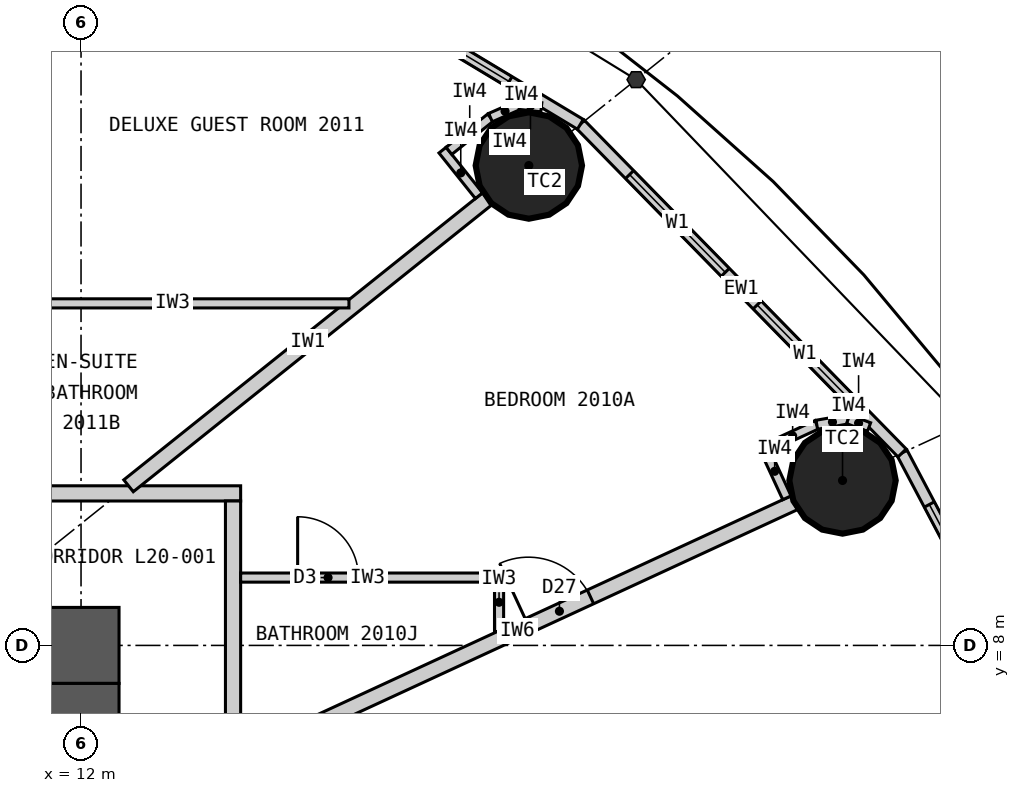
"""IFC4 building model, lengths in metres.
Left out: names, types, materials, properties, quantities, classifications, styles, units other than length and angle.
Written with IfcOpenShell. Run it as: python <this file> out.ifc"""

import sys

from ifc_helpers import new_model, si_unit, direction, frame, frame_2d, origin, origin_2d, place, context, subcontext, project, spatial, rectangle, circle, extrude, element, fill, save


model = new_model("IFC4")
c1 = context("Model", 3, precision=1e-05, world=origin(), true_north=direction((0.0, 1.0)))
c2 = subcontext(c1, "Body", "Model", "MODEL_VIEW")
j1 = project(units=[si_unit("LENGTHUNIT", "METRE"), si_unit("PLANEANGLEUNIT", "RADIAN")], contexts=[c1])
p1 = place(None, origin())
s1 = spatial("IfcSite", under=j1, at=p1, CompositionType="ELEMENT")
p2 = place(p1, origin())
s2 = spatial("IfcBuilding", under=s1, at=p2, CompositionType="ELEMENT")
p3 = place(p2, frame((0.0, 0.0, 80.4)))
s3 = spatial("IfcBuildingStorey", under=s2, at=p3, CompositionType="ELEMENT", Elevation=80.4)
for number, where, z_axis, x_axis in (
    (1, (22.019, 10.17, 0.0), (0.0, 0.0, 1.0), (1.0, 0.0, 0.0)),
    (2, (17.892, 14.313, 0.0), (0.0, 0.0, 1.0), (1.0, 0.0, 0.0)),
):
    element("IfcColumn", number, at=place(p3, frame(where, z_axis=z_axis, x_axis=x_axis)), inside=s3, PredefinedType="COLUMN", context=c2, shape_type="SweptSolid", body=[
        extrude(circle(Radius=0.7, at=origin_2d()), origin(), (0.0, 0.0, 1.0), 3.3),
    ])
p4 = place(p3, frame((-12.5, 8.0, 0.0), z_axis=(0.0, 0.0, 1.0), x_axis=(1.0, 0.0, 0.0)))
e3 = element("IfcWall", 3, at=p4, inside=s3, PredefinedType="SHEAR", context=c2, shape_type="SweptSolid", body=[
    extrude(rectangle(XDim=25.0, YDim=1.0, at=frame_2d((12.5, 0.0))), origin(), (0.0, 0.0, 1.0), 3.3),
])
p5 = place(p4, frame((11.2, 0.0, 0.0)))
e4 = element("IfcOpeningElement", 4, at=p5, cuts=e3, PredefinedType="OPENING", context=c2, shape_type="SweptSolid", body=[
    extrude(rectangle(XDim=1.2, YDim=2.2, at=frame_2d((0.6, 1.1))), frame((0.0, 0.51, 0.0), z_axis=(0.0, -1.0, 0.0), x_axis=(1.0, 0.0, 0.0)), (0.0, 0.0, 1.0), 1.02),
])
p6 = place(p4, frame((18.8, 0.0, 0.0)))
e5 = element("IfcOpeningElement", 5, at=p6, cuts=e3, PredefinedType="OPENING", context=c2, shape_type="SweptSolid", body=[
    extrude(rectangle(XDim=0.9, YDim=2.2, at=frame_2d((0.45, 1.1))), frame((0.0, 0.51, 0.0), z_axis=(0.0, -1.0, 0.0), x_axis=(1.0, 0.0, 0.0)), (0.0, 0.0, 1.0), 1.02),
])
p7 = place(p3, frame((12.0, -7.5, 0.0), z_axis=(0.0, 0.0, 1.0), x_axis=(0.0, 1.0, 0.0)))
e6 = element("IfcWall", 6, at=p7, inside=s3, PredefinedType="SHEAR", context=c2, shape_type="SweptSolid", body=[
    extrude(rectangle(XDim=15.0, YDim=1.0, at=frame_2d((7.5, 0.0))), origin(), (0.0, 0.0, 1.0), 3.3),
])
p8 = place(p7, frame((6.6, 0.0, 0.0)))
e7 = element("IfcOpeningElement", 7, at=p8, cuts=e6, PredefinedType="OPENING", context=c2, shape_type="SweptSolid", body=[
    extrude(rectangle(XDim=1.8, YDim=2.2, at=frame_2d((0.9, 1.1))), frame((0.0, 0.51, 0.0), z_axis=(0.0, -1.0, 0.0), x_axis=(1.0, 0.0, 0.0)), (0.0, 0.0, 1.0), 1.02),
])
p9 = place(p3, frame((25.482, 5.462, 0.0), z_axis=(0.0, 0.0, 1.0), x_axis=(-0.467296867008, 0.884100468321, 0.0)))
e8 = element("IfcWall", 8, at=p9, inside=s3, PredefinedType="ELEMENTEDWALL", context=c2, shape_type="SweptSolid", body=[
    extrude(rectangle(XDim=5.734, YDim=0.15, at=frame_2d((2.867, 0.0))), origin(), (0.0, 0.0, 1.0), 3.12),
])
p10 = place(p9, frame((0.767, 0.0, 0.9)))
e9 = element("IfcOpeningElement", 9, at=p10, cuts=e8, PredefinedType="OPENING", context=c2, shape_type="SweptSolid", body=[
    extrude(rectangle(XDim=1.8, YDim=1.9, at=frame_2d((0.9, 0.95))), frame((0.0, 0.085, 0.0), z_axis=(0.0, -1.0, 0.0), x_axis=(1.0, 0.0, 0.0)), (0.0, 0.0, 1.0), 0.17),
])
p11 = place(p9, frame((3.167, 0.0, 0.9)))
e10 = element("IfcOpeningElement", 10, at=p11, cuts=e8, PredefinedType="OPENING", context=c2, shape_type="SweptSolid", body=[
    extrude(rectangle(XDim=1.8, YDim=1.9, at=frame_2d((0.9, 0.95))), frame((0.0, 0.085, 0.0), z_axis=(0.0, -1.0, 0.0), x_axis=(1.0, 0.0, 0.0)), (0.0, 0.0, 1.0), 0.17),
])
p12 = place(p3, frame((22.803, 10.532, 0.0), z_axis=(0.0, 0.0, 1.0), x_axis=(-0.699602905915, 0.714531856557, 0.0)))
e11 = element("IfcWall", 11, at=p12, inside=s3, PredefinedType="ELEMENTEDWALL", context=c2, shape_type="SweptSolid", body=[
    extrude(rectangle(XDim=6.051, YDim=0.15, at=frame_2d((3.025, 0.0))), origin(), (0.0, 0.0, 1.0), 3.12),
])
p13 = place(p12, frame((0.926, 0.0, 0.9)))
e12 = element("IfcOpeningElement", 12, at=p13, cuts=e11, PredefinedType="OPENING", context=c2, shape_type="SweptSolid", body=[
    extrude(rectangle(XDim=1.8, YDim=1.9, at=frame_2d((0.9, 0.95))), frame((0.0, 0.085, 0.0), z_axis=(0.0, -1.0, 0.0), x_axis=(1.0, 0.0, 0.0)), (0.0, 0.0, 1.0), 0.17),
])
p14 = place(p12, frame((3.325, 0.0, 0.9)))
e13 = element("IfcOpeningElement", 13, at=p14, cuts=e11, PredefinedType="OPENING", context=c2, shape_type="SweptSolid", body=[
    extrude(rectangle(XDim=1.8, YDim=1.9, at=frame_2d((0.9, 0.95))), frame((0.0, 0.085, 0.0), z_axis=(0.0, -1.0, 0.0), x_axis=(1.0, 0.0, 0.0)), (0.0, 0.0, 1.0), 0.17),
])
p15 = place(p3, frame((18.57, 14.856, 0.0), z_axis=(0.0, 0.0, 1.0), x_axis=(-0.856983180864, 0.515344377787, 0.0)))
e14 = element("IfcWall", 14, at=p15, inside=s3, PredefinedType="ELEMENTEDWALL", context=c2, shape_type="SweptSolid", body=[
    extrude(rectangle(XDim=6.386, YDim=0.15, at=frame_2d((3.193, 0.0))), origin(), (0.0, 0.0, 1.0), 3.12),
])
p16 = place(p15, frame((1.093, 0.0, 0.9)))
e15 = element("IfcOpeningElement", 15, at=p16, cuts=e14, PredefinedType="OPENING", context=c2, shape_type="SweptSolid", body=[
    extrude(rectangle(XDim=1.8, YDim=1.9, at=frame_2d((0.9, 0.95))), frame((0.0, 0.085, 0.0), z_axis=(0.0, -1.0, 0.0), x_axis=(1.0, 0.0, 0.0)), (0.0, 0.0, 1.0), 0.17),
])
p17 = place(p15, frame((3.493, 0.0, 0.9)))
e16 = element("IfcOpeningElement", 16, at=p17, cuts=e14, PredefinedType="OPENING", context=c2, shape_type="SweptSolid", body=[
    extrude(rectangle(XDim=1.8, YDim=1.9, at=frame_2d((0.9, 0.95))), frame((0.0, 0.085, 0.0), z_axis=(0.0, -1.0, 0.0), x_axis=(1.0, 0.0, 0.0)), (0.0, 0.0, 1.0), 0.17),
])
p18 = place(p3, frame((-14.1, 10.0, 0.0), z_axis=(0.0, 0.0, 1.0), x_axis=(1.0, 0.0, 0.0)))
e17 = element("IfcWall", 17, at=p18, inside=s3, PredefinedType="PARTITIONING", context=c2, shape_type="SweptSolid", body=[
    extrude(rectangle(XDim=28.2, YDim=0.2, at=frame_2d((14.1, 0.0))), origin(), (0.0, 0.0, 1.0), 3.12),
])
p19 = place(p18, frame((23.865, 0.0, 0.0)))
e18 = element("IfcOpeningElement", 18, at=p19, cuts=e17, PredefinedType="OPENING", context=c2, shape_type="SweptSolid", body=[
    extrude(rectangle(XDim=1.0, YDim=2.2, at=frame_2d((0.5, 1.1))), frame((0.0, 0.11, 0.0), z_axis=(0.0, -1.0, 0.0), x_axis=(1.0, 0.0, 0.0)), (0.0, 0.0, 1.0), 0.22),
])
p20 = place(p18, frame((18.529, 0.0, 0.0)))
e19 = element("IfcOpeningElement", 19, at=p20, cuts=e17, PredefinedType="OPENING", context=c2, shape_type="SweptSolid", body=[
    extrude(rectangle(XDim=1.0, YDim=2.2, at=frame_2d((0.5, 1.1))), frame((0.0, 0.11, 0.0), z_axis=(0.0, -1.0, 0.0), x_axis=(1.0, 0.0, 0.0)), (0.0, 0.0, 1.0), 0.22),
])
p21 = place(p18, frame((14.623, 0.0, 0.0)))
e20 = element("IfcOpeningElement", 20, at=p21, cuts=e17, PredefinedType="OPENING", context=c2, shape_type="SweptSolid", body=[
    extrude(rectangle(XDim=1.0, YDim=2.2, at=frame_2d((0.5, 1.1))), frame((0.0, 0.11, 0.0), z_axis=(0.0, -1.0, 0.0), x_axis=(1.0, 0.0, 0.0)), (0.0, 0.0, 1.0), 0.22),
])
p22 = place(p18, frame((11.24, 0.0, 0.0)))
e21 = element("IfcOpeningElement", 21, at=p22, cuts=e17, PredefinedType="OPENING", context=c2, shape_type="SweptSolid", body=[
    extrude(rectangle(XDim=1.0, YDim=2.2, at=frame_2d((0.5, 1.1))), frame((0.0, 0.11, 0.0), z_axis=(0.0, -1.0, 0.0), x_axis=(1.0, 0.0, 0.0)), (0.0, 0.0, 1.0), 0.22),
])
p23 = place(p18, frame((8.671, 0.0, 0.0)))
e22 = element("IfcOpeningElement", 22, at=p23, cuts=e17, PredefinedType="OPENING", context=c2, shape_type="SweptSolid", body=[
    extrude(rectangle(XDim=1.0, YDim=2.2, at=frame_2d((0.5, 1.1))), frame((0.0, 0.11, 0.0), z_axis=(0.0, -1.0, 0.0), x_axis=(1.0, 0.0, 0.0)), (0.0, 0.0, 1.0), 0.22),
])
p24 = place(p18, frame((2.801, 0.0, 0.0)))
e23 = element("IfcOpeningElement", 23, at=p24, cuts=e17, PredefinedType="OPENING", context=c2, shape_type="SweptSolid", body=[
    extrude(rectangle(XDim=1.0, YDim=2.2, at=frame_2d((0.5, 1.1))), frame((0.0, 0.11, 0.0), z_axis=(0.0, -1.0, 0.0), x_axis=(1.0, 0.0, 0.0)), (0.0, 0.0, 1.0), 0.22),
])
p25 = place(p3, frame((14.0, -9.9, 0.0), z_axis=(0.0, 0.0, 1.0), x_axis=(0.0, 1.0, 0.0)))
e24 = element("IfcWall", 24, at=p25, inside=s3, PredefinedType="PARTITIONING", context=c2, shape_type="SweptSolid", body=[
    extrude(rectangle(XDim=19.8, YDim=0.2, at=frame_2d((9.9, 0.0))), origin(), (0.0, 0.0, 1.0), 3.12),
])
p26 = place(p25, frame((5.948, 0.0, 0.0)))
e25 = element("IfcOpeningElement", 25, at=p26, cuts=e24, PredefinedType="OPENING", context=c2, shape_type="SweptSolid", body=[
    extrude(rectangle(XDim=1.0, YDim=2.2, at=frame_2d((0.5, 1.1))), frame((0.0, 0.11, 0.0), z_axis=(0.0, -1.0, 0.0), x_axis=(1.0, 0.0, 0.0)), (0.0, 0.0, 1.0), 0.22),
])
p27 = place(p25, frame((11.46, 0.0, 0.0)))
e26 = element("IfcOpeningElement", 26, at=p27, cuts=e24, PredefinedType="OPENING", context=c2, shape_type="SweptSolid", body=[
    extrude(rectangle(XDim=1.0, YDim=2.2, at=frame_2d((0.5, 1.1))), frame((0.0, 0.11, 0.0), z_axis=(0.0, -1.0, 0.0), x_axis=(1.0, 0.0, 0.0)), (0.0, 0.0, 1.0), 0.22),
])
p28 = place(p3, frame((14.1, 6.512, 0.0), z_axis=(0.0, 0.0, 1.0), x_axis=(0.907832871056, 0.419332181247, 0.0)))
e27 = element("IfcWall", 27, at=p28, inside=s3, PredefinedType="PARTITIONING", context=c2, shape_type="SweptSolid", body=[
    extrude(rectangle(XDim=8.023, YDim=0.2, at=frame_2d((4.011, 0.0))), origin(), (0.0, 0.0, 1.0), 2.32),
])
p29 = place(p28, frame((4.17, 0.0, 0.0)))
e28 = element("IfcOpeningElement", 28, at=p29, cuts=e27, PredefinedType="OPENING", context=c2, shape_type="SweptSolid", body=[
    extrude(rectangle(XDim=0.9, YDim=2.1, at=frame_2d((0.45, 1.05))), frame((0.0, 0.11, 0.0), z_axis=(0.0, -1.0, 0.0), x_axis=(1.0, 0.0, 0.0)), (0.0, 0.0, 1.0), 0.22),
])
p30 = place(p3, frame((12.625, 10.1, 0.0), z_axis=(0.0, 0.0, 1.0), x_axis=(0.780892451574, 0.624665493744, 0.0)))
e29 = element("IfcWall", 29, at=p30, inside=s3, PredefinedType="PARTITIONING", context=c2, shape_type="SweptSolid", body=[
    extrude(rectangle(XDim=6.045, YDim=0.2, at=frame_2d((3.022, 0.0))), origin(), (0.0, 0.0, 1.0), 2.32),
])
p31 = place(p3, frame((7.289, 10.1, 0.0), z_axis=(0.0, 0.0, 1.0), x_axis=(0.585198353053, 0.810890182197, 0.0)))
e30 = element("IfcWall", 30, at=p31, inside=s3, PredefinedType="PARTITIONING", context=c2, shape_type="SweptSolid", body=[
    extrude(rectangle(XDim=8.36, YDim=0.2, at=frame_2d((4.18, 0.0))), origin(), (0.0, 0.0, 1.0), 2.32),
])
p32 = place(p3, frame((17.5, 8.183, 0.0), z_axis=(0.0, 0.0, 1.0), x_axis=(0.0, 1.0, 0.0)))
e31 = element("IfcWall", 31, at=p32, inside=s3, PredefinedType="PARTITIONING", context=c2, shape_type="SweptSolid", body=[
    extrude(rectangle(XDim=0.77, YDim=0.12, at=frame_2d((0.385, 0.0))), origin(), (0.0, 0.0, 1.0), 3.12),
])
p33 = place(p3, frame((14.1, 8.893, 0.0), z_axis=(0.0, 0.0, 1.0), x_axis=(1.0, 0.0, 0.0)))
e32 = element("IfcWall", 32, at=p33, inside=s3, PredefinedType="PARTITIONING", context=c2, shape_type="SweptSolid", body=[
    extrude(rectangle(XDim=3.34, YDim=0.12, at=frame_2d((1.67, 0.0))), origin(), (0.0, 0.0, 1.0), 3.12),
])
p34 = place(p33, frame((0.75, 0.0, 0.0)))
e33 = element("IfcOpeningElement", 33, at=p34, cuts=e32, PredefinedType="OPENING", context=c2, shape_type="SweptSolid", body=[
    extrude(rectangle(XDim=0.8, YDim=2.1, at=frame_2d((0.4, 1.05))), frame((0.0, 0.07, 0.0), z_axis=(0.0, -1.0, 0.0), x_axis=(1.0, 0.0, 0.0)), (0.0, 0.0, 1.0), 0.14),
])
p35 = place(p3, frame((15.525, 12.5, 0.0), z_axis=(0.0, 0.0, 1.0), x_axis=(-1.0, 0.0, 0.0)))
e34 = element("IfcWall", 34, at=p35, inside=s3, PredefinedType="PARTITIONING", context=c2, shape_type="SweptSolid", body=[
    extrude(rectangle(XDim=4.64, YDim=0.12, at=frame_2d((2.32, 0.0))), origin(), (0.0, 0.0, 1.0), 3.12),
])
p36 = place(p3, frame((21.287, 9.942, 0.0), z_axis=(0.0, 0.0, 1.0), x_axis=(-0.419259891039, 0.907866258744, 0.0)))
e35 = element("IfcWall", 35, at=p36, inside=s3, PredefinedType="PARTITIONING", context=c2, shape_type="SweptSolid", body=[
    extrude(rectangle(XDim=0.768, YDim=0.12, at=frame_2d((0.384, 0.0))), origin(), (0.0, 0.0, 1.0), 3.12),
])
p37 = place(p3, frame((21.045, 10.61, 0.0), z_axis=(0.0, 0.0, 1.0), x_axis=(0.907877701396, 0.419235112208, 0.0)))
e36 = element("IfcWall", 36, at=p37, inside=s3, PredefinedType="PARTITIONING", context=c2, shape_type="SweptSolid", body=[
    extrude(rectangle(XDim=0.7, YDim=0.12, at=frame_2d((0.35, 0.0))), origin(), (0.0, 0.0, 1.0), 3.12),
])
p38 = place(p3, frame((21.68, 10.903, 0.0), z_axis=(0.0, 0.0, 1.0), x_axis=(0.985446622073, 0.169985161247, 0.0)))
e37 = element("IfcWall", 37, at=p38, inside=s3, PredefinedType="PARTITIONING", context=c2, shape_type="SweptSolid", body=[
    extrude(rectangle(XDim=0.418, YDim=0.12, at=frame_2d((0.209, 0.0))), origin(), (0.0, 0.0, 1.0), 3.12),
])
p39 = place(p3, frame((22.092, 10.974, 0.0), z_axis=(0.0, 0.0, 1.0), x_axis=(0.938428160676, -0.345474437912, 0.0)))
e38 = element("IfcWall", 38, at=p39, inside=s3, PredefinedType="PARTITIONING", context=c2, shape_type="SweptSolid", body=[
    extrude(rectangle(XDim=0.294, YDim=0.12, at=frame_2d((0.147, 0.0))), origin(), (0.0, 0.0, 1.0), 3.12),
])
p40 = place(p3, frame((17.236, 13.917, 0.0), z_axis=(0.0, 0.0, 1.0), x_axis=(-0.624695047554, 0.780868809443, 0.0)))
e39 = element("IfcWall", 39, at=p40, inside=s3, PredefinedType="PARTITIONING", context=c2, shape_type="SweptSolid", body=[
    extrude(rectangle(XDim=0.768, YDim=0.12, at=frame_2d((0.384, 0.0))), origin(), (0.0, 0.0, 1.0), 3.12),
])
p41 = place(p3, frame((16.841, 14.507, 0.0), z_axis=(0.0, 0.0, 1.0), x_axis=(0.780902834923, 0.62465251333, 0.0)))
e40 = element("IfcWall", 40, at=p41, inside=s3, PredefinedType="PARTITIONING", context=c2, shape_type="SweptSolid", body=[
    extrude(rectangle(XDim=0.7, YDim=0.12, at=frame_2d((0.35, 0.0))), origin(), (0.0, 0.0, 1.0), 3.12),
])
p42 = place(p3, frame((17.387, 14.944, 0.0), z_axis=(0.0, 0.0, 1.0), x_axis=(0.916036698064, 0.401094462441, 0.0)))
e41 = element("IfcWall", 41, at=p42, inside=s3, PredefinedType="PARTITIONING", context=c2, shape_type="SweptSolid", body=[
    extrude(rectangle(XDim=0.418, YDim=0.12, at=frame_2d((0.209, 0.0))), origin(), (0.0, 0.0, 1.0), 3.12),
])
p43 = place(p3, frame((17.77, 15.112, 0.0), z_axis=(0.0, 0.0, 1.0), x_axis=(0.993904401174, -0.110245368731, 0.0)))
e42 = element("IfcWall", 42, at=p43, inside=s3, PredefinedType="PARTITIONING", context=c2, shape_type="SweptSolid", body=[
    extrude(rectangle(XDim=0.288, YDim=0.12, at=frame_2d((0.144, 0.0))), origin(), (0.0, 0.0, 1.0), 3.12),
])
p44 = place(p11, origin())
e43 = element("IfcWindow", 43, at=p44, inside=s3, PartitioningType="SINGLE_PANEL", PredefinedType="WINDOW", context=c2, shape_type="SweptSolid", body=[
    extrude(rectangle(XDim=1.8, YDim=1.9, at=frame_2d((0.9, 0.95))), frame((0.0, 0.03, 0.0), z_axis=(0.0, -1.0, 0.0), x_axis=(1.0, 0.0, 0.0)), (0.0, 0.0, 1.0), 0.06),
])
fill(e10, e43)
p45 = place(p13, origin())
e44 = element("IfcWindow", 44, at=p45, inside=s3, PartitioningType="SINGLE_PANEL", PredefinedType="WINDOW", context=c2, shape_type="SweptSolid", body=[
    extrude(rectangle(XDim=1.8, YDim=1.9, at=frame_2d((0.9, 0.95))), frame((0.0, 0.03, 0.0), z_axis=(0.0, -1.0, 0.0), x_axis=(1.0, 0.0, 0.0)), (0.0, 0.0, 1.0), 0.06),
])
fill(e12, e44)
p46 = place(p14, origin())
e45 = element("IfcWindow", 45, at=p46, inside=s3, PartitioningType="SINGLE_PANEL", PredefinedType="WINDOW", context=c2, shape_type="SweptSolid", body=[
    extrude(rectangle(XDim=1.8, YDim=1.9, at=frame_2d((0.9, 0.95))), frame((0.0, 0.03, 0.0), z_axis=(0.0, -1.0, 0.0), x_axis=(1.0, 0.0, 0.0)), (0.0, 0.0, 1.0), 0.06),
])
fill(e13, e45)
p47 = place(p16, origin())
e46 = element("IfcWindow", 46, at=p47, inside=s3, PartitioningType="SINGLE_PANEL", PredefinedType="WINDOW", context=c2, shape_type="SweptSolid", body=[
    extrude(rectangle(XDim=1.8, YDim=1.9, at=frame_2d((0.9, 0.95))), frame((0.0, 0.03, 0.0), z_axis=(0.0, -1.0, 0.0), x_axis=(1.0, 0.0, 0.0)), (0.0, 0.0, 1.0), 0.06),
])
fill(e15, e46)
p48 = place(p34, origin())
e47 = element("IfcDoor", 47, at=p48, inside=s3, OperationType="SINGLE_SWING_LEFT", PredefinedType="DOOR", context=c2, shape_type="SweptSolid", body=[
    extrude(rectangle(XDim=0.8, YDim=2.1, at=frame_2d((0.4, 1.05))), frame((0.0, 0.025, 0.0), z_axis=(0.0, -1.0, 0.0), x_axis=(1.0, 0.0, 0.0)), (0.0, 0.0, 1.0), 0.05),
])
fill(e33, e47)
p49 = place(p29, origin())
e48 = element("IfcDoor", 48, at=p49, inside=s3, OperationType="SINGLE_SWING_LEFT", PredefinedType="DOOR", context=c2, shape_type="SweptSolid", body=[
    extrude(rectangle(XDim=0.9, YDim=2.1, at=frame_2d((0.45, 1.05))), frame((0.0, 0.025, 0.0), z_axis=(0.0, -1.0, 0.0), x_axis=(1.0, 0.0, 0.0)), (0.0, 0.0, 1.0), 0.05),
])
fill(e28, e48)
save(model, sys.argv[1])
